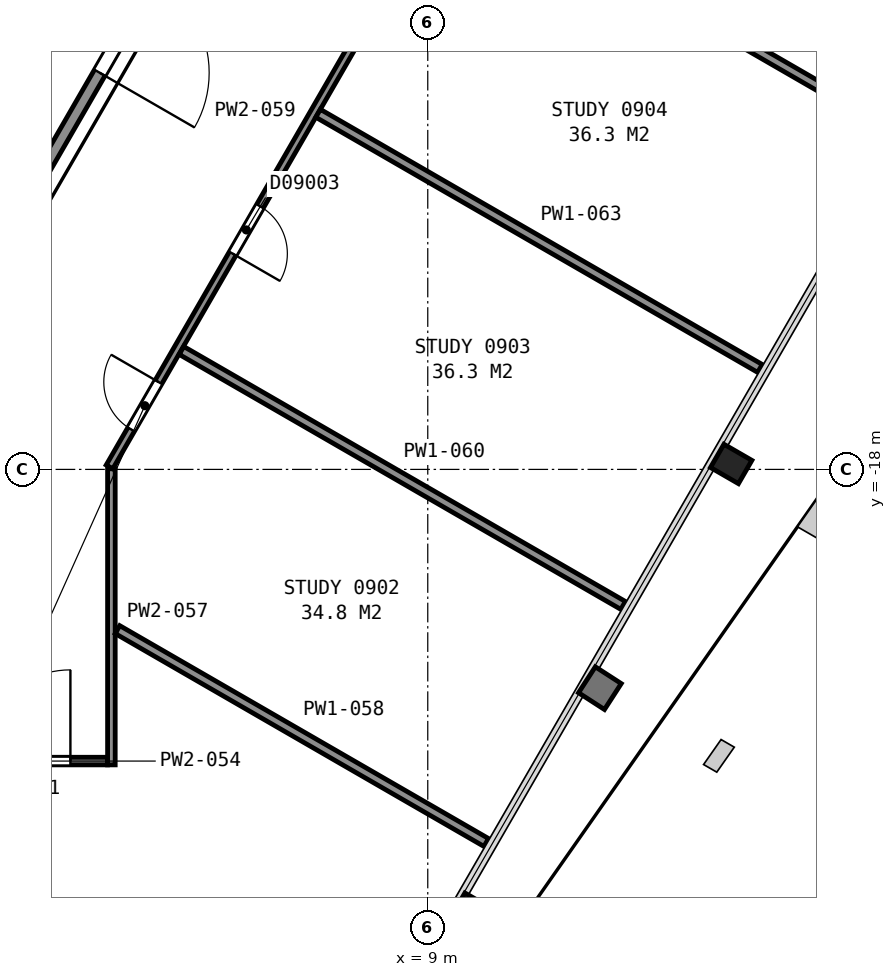
"""IFC4 building model, lengths in metres.
Left out: names, types, materials, properties, quantities, classifications, styles, units other than length and angle.
Written with IfcOpenShell. Run it as: python <this file> out.ifc"""

import sys

from ifc_helpers import new_model, si_unit, direction, frame, frame_2d, origin, origin_2d, place, context, subcontext, project, spatial, rectangle, i_section, extrude, element, fill, save


model = new_model("IFC4")
c1 = context("Model", 3, precision=1e-05, world=origin(), true_north=direction((0.0, 1.0)))
c2 = subcontext(c1, "Body", "Model", "MODEL_VIEW")
j1 = project(units=[si_unit("LENGTHUNIT", "METRE"), si_unit("PLANEANGLEUNIT", "RADIAN")], contexts=[c1])
p1 = place(None, origin())
s1 = spatial("IfcSite", under=j1, at=p1, CompositionType="ELEMENT")
p2 = place(p1, origin())
s2 = spatial("IfcBuilding", under=s1, at=p2, CompositionType="ELEMENT")
p3 = place(p2, frame((0.0, 0.0, 47.6)))
s3 = spatial("IfcBuildingStorey", under=s2, at=p3, CompositionType="ELEMENT", Elevation=47.6)
for number, where, z_axis, x_axis in (
    (1, (9.73, -25.29, 0.025), (0.0, 0.0, 1.0), (-0.5, -0.866, 0.0)),
    (2, (13.99, -17.91, 0.025), (0.0, 0.0, 1.0), (-0.5, -0.866, 0.0)),
):
    element("IfcColumn", number, at=place(p3, frame(where, z_axis=z_axis, x_axis=x_axis)), inside=s3, PredefinedType="COLUMN", context=c2, shape_type="SweptSolid", body=[
        extrude(i_section(OverallWidth=0.442, OverallDepth=0.531, WebThickness=0.066, FlangeThickness=0.106, FilletRadius=0.015, at=origin_2d()), origin(), (0.0, 0.0, 1.0), 3.575),
    ])
p4 = place(p3, frame((1.677, -14.815, 0.0), z_axis=(0.0, 0.0, 1.0), x_axis=(0.49999445743, 0.866028603765, 0.0)))
e3 = element("IfcWall", 3, at=p4, inside=s3, PredefinedType="PARTITIONING", context=c2, shape_type="SweptSolid", body=[
    extrude(rectangle(XDim=5.905, YDim=0.2, at=frame_2d((2.952, 0.0))), origin(), (0.0, 0.0, 1.0), 3.35),
])
p5 = place(p4, frame((3.855, 0.0, 0.0)))
e4 = element("IfcOpeningElement", 4, at=p5, cuts=e3, PredefinedType="OPENING", context=c2, shape_type="SweptSolid", body=[
    extrude(rectangle(XDim=1.8, YDim=2.1, at=frame_2d((0.9, 1.05))), frame((0.0, 0.11, 0.0), z_axis=(0.0, -1.0, 0.0), x_axis=(1.0, 0.0, 0.0)), (0.0, 0.0, 1.0), 0.22),
])
p6 = place(p3, frame((3.732, -22.797, 0.0), z_axis=(0.0, 0.0, 1.0), x_axis=(-1.0, 0.0, 0.0)))
e5 = element("IfcWall", 5, at=p6, inside=s3, PredefinedType="PARTITIONING", context=c2, shape_type="SweptSolid", body=[
    extrude(rectangle(XDim=2.822, YDim=0.125, at=frame_2d((1.411, 0.0))), origin(), (0.0, 0.0, 1.0), 2.613),
])
p7 = place(p6, frame((0.609, 0.0, 0.0)))
e6 = element("IfcOpeningElement", 6, at=p7, cuts=e5, PredefinedType="OPENING", context=c2, shape_type="SweptSolid", body=[
    extrude(rectangle(XDim=1.5, YDim=2.1, at=frame_2d((0.75, 1.05))), frame((0.0, 0.073, 0.0), z_axis=(0.0, -1.0, 0.0), x_axis=(1.0, 0.0, 0.0)), (0.0, 0.0, 1.0), 0.145),
])
p8 = place(p3, frame((3.797, -22.86, 0.0), z_axis=(0.0, 0.0, 1.0), x_axis=(0.0, 1.0, 0.0)))
e7 = element("IfcWall", 7, at=p8, inside=s3, PredefinedType="PARTITIONING", context=c2, shape_type="SweptSolid", body=[
    extrude(rectangle(XDim=4.87, YDim=0.125, at=frame_2d((2.435, 0.0))), origin(), (0.0, 0.0, 1.0), 2.613),
])
p9 = place(p3, frame((3.897, -20.635, 0.0), z_axis=(0.0, 0.0, 1.0), x_axis=(0.866031150847, -0.499990045664, 0.0)))
e8 = element("IfcWall", 8, at=p9, inside=s3, PredefinedType="PARTITIONING", context=c2, shape_type="SweptSolid", body=[
    extrude(rectangle(XDim=7.003, YDim=0.15, at=frame_2d((3.501, 0.0))), origin(), (0.0, 0.0, 1.0), 2.613),
])
p10 = place(p3, frame((17.833, 6.406, 0.0), z_axis=(0.0, 0.0, 1.0), x_axis=(-0.500002884005, -0.866023738697, 0.0)))
e9 = element("IfcWall", 9, at=p10, inside=s3, PredefinedType="PARTITIONING", context=c2, shape_type="SweptSolid", body=[
    extrude(rectangle(XDim=28.135, YDim=0.125, at=frame_2d((14.067, 0.0))), origin(), (0.0, 0.0, 1.0), 2.613),
])
p11 = place(p10, frame((26.522, 0.0, 0.0)))
e10 = element("IfcOpeningElement", 10, at=p11, cuts=e9, PredefinedType="OPENING", context=c2, shape_type="SweptSolid", body=[
    extrude(rectangle(XDim=0.9, YDim=2.1, at=frame_2d((0.45, 1.05))), frame((0.0, 0.073, 0.0), z_axis=(0.0, -1.0, 0.0), x_axis=(1.0, 0.0, 0.0)), (0.0, 0.0, 1.0), 0.145),
])
p12 = place(p10, frame((23.184, 0.0, 0.0)))
e11 = element("IfcOpeningElement", 11, at=p12, cuts=e9, PredefinedType="OPENING", context=c2, shape_type="SweptSolid", body=[
    extrude(rectangle(XDim=0.9, YDim=2.1, at=frame_2d((0.45, 1.05))), frame((0.0, 0.073, 0.0), z_axis=(0.0, -1.0, 0.0), x_axis=(1.0, 0.0, 0.0)), (0.0, 0.0, 1.0), 0.145),
])
p13 = place(p10, frame((18.683, 0.0, 0.0)))
e12 = element("IfcOpeningElement", 12, at=p13, cuts=e9, PredefinedType="OPENING", context=c2, shape_type="SweptSolid", body=[
    extrude(rectangle(XDim=0.9, YDim=2.1, at=frame_2d((0.45, 1.05))), frame((0.0, 0.073, 0.0), z_axis=(0.0, -1.0, 0.0), x_axis=(1.0, 0.0, 0.0)), (0.0, 0.0, 1.0), 0.145),
])
p14 = place(p10, frame((14.182, 0.0, 0.0)))
e13 = element("IfcOpeningElement", 13, at=p14, cuts=e9, PredefinedType="OPENING", context=c2, shape_type="SweptSolid", body=[
    extrude(rectangle(XDim=0.9, YDim=2.1, at=frame_2d((0.45, 1.05))), frame((0.0, 0.073, 0.0), z_axis=(0.0, -1.0, 0.0), x_axis=(1.0, 0.0, 0.0)), (0.0, 0.0, 1.0), 0.145),
])
p15 = place(p10, frame((9.681, 0.0, 0.0)))
e14 = element("IfcOpeningElement", 14, at=p15, cuts=e9, PredefinedType="OPENING", context=c2, shape_type="SweptSolid", body=[
    extrude(rectangle(XDim=0.9, YDim=2.1, at=frame_2d((0.45, 1.05))), frame((0.0, 0.073, 0.0), z_axis=(0.0, -1.0, 0.0), x_axis=(1.0, 0.0, 0.0)), (0.0, 0.0, 1.0), 0.145),
])
p16 = place(p10, frame((5.18, 0.0, 0.0)))
e15 = element("IfcOpeningElement", 15, at=p16, cuts=e9, PredefinedType="OPENING", context=c2, shape_type="SweptSolid", body=[
    extrude(rectangle(XDim=0.9, YDim=2.1, at=frame_2d((0.45, 1.05))), frame((0.0, 0.073, 0.0), z_axis=(0.0, -1.0, 0.0), x_axis=(1.0, 0.0, 0.0)), (0.0, 0.0, 1.0), 0.145),
])
p17 = place(p10, frame((1.278, 0.0, 0.0)))
e16 = element("IfcOpeningElement", 16, at=p17, cuts=e9, PredefinedType="OPENING", context=c2, shape_type="SweptSolid", body=[
    extrude(rectangle(XDim=0.9, YDim=2.1, at=frame_2d((0.45, 1.05))), frame((0.0, 0.073, 0.0), z_axis=(0.0, -1.0, 0.0), x_axis=(1.0, 0.0, 0.0)), (0.0, 0.0, 1.0), 0.145),
])
p18 = place(p3, frame((4.949, -16.044, 0.0), z_axis=(0.0, 0.0, 1.0), x_axis=(0.866040157966, -0.499974444137, 0.0)))
e17 = element("IfcWall", 17, at=p18, inside=s3, PredefinedType="PARTITIONING", context=c2, shape_type="SweptSolid", body=[
    extrude(rectangle(XDim=8.387, YDim=0.15, at=frame_2d((4.193, 0.0))), origin(), (0.0, 0.0, 1.0), 2.613),
])
p19 = place(p3, frame((7.196, -12.143, 0.0), z_axis=(0.0, 0.0, 1.0), x_axis=(0.866010672798, -0.500025513949, 0.0)))
e18 = element("IfcWall", 18, at=p19, inside=s3, PredefinedType="PARTITIONING", context=c2, shape_type="SweptSolid", body=[
    extrude(rectangle(XDim=8.391, YDim=0.15, at=frame_2d((4.196, 0.0))), origin(), (0.0, 0.0, 1.0), 2.613),
])
p20 = place(p3, frame((9.45, -8.248, 0.0), z_axis=(0.0, 0.0, 1.0), x_axis=(0.866040157966, -0.499974444137, 0.0)))
e19 = element("IfcWall", 19, at=p20, inside=s3, PredefinedType="PARTITIONING", context=c2, shape_type="SweptSolid", body=[
    extrude(rectangle(XDim=8.387, YDim=0.15, at=frame_2d((4.193, 0.0))), origin(), (0.0, 0.0, 1.0), 2.613),
])
p21 = place(p5, origin())
e20 = element("IfcDoor", 20, at=p21, inside=s3, OperationType="DOUBLE_DOOR_SINGLE_SWING", PredefinedType="DOOR", context=c2, shape_type="SweptSolid", body=[
    extrude(rectangle(XDim=1.8, YDim=2.1, at=frame_2d((0.9, 1.05))), frame((0.0, 0.025, 0.0), z_axis=(0.0, -1.0, 0.0), x_axis=(1.0, 0.0, 0.0)), (0.0, 0.0, 1.0), 0.05),
])
fill(e4, e20)
p22 = place(p7, origin())
e21 = element("IfcDoor", 21, at=p22, inside=s3, OperationType="DOUBLE_DOOR_SINGLE_SWING", PredefinedType="DOOR", context=c2, shape_type="SweptSolid", body=[
    extrude(rectangle(XDim=1.5, YDim=2.1, at=frame_2d((0.75, 1.05))), frame((0.0, 0.025, 0.0), z_axis=(0.0, -1.0, 0.0), x_axis=(1.0, 0.0, 0.0)), (0.0, 0.0, 1.0), 0.05),
])
fill(e6, e21)
p23 = place(p11, origin())
e22 = element("IfcDoor", 22, at=p23, inside=s3, OperationType="SINGLE_SWING_LEFT", PredefinedType="DOOR", context=c2, shape_type="SweptSolid", body=[
    extrude(rectangle(XDim=0.9, YDim=2.1, at=frame_2d((0.45, 1.05))), frame((0.0, 0.025, 0.0), z_axis=(0.0, -1.0, 0.0), x_axis=(1.0, 0.0, 0.0)), (0.0, 0.0, 1.0), 0.05),
])
fill(e10, e22)
p24 = place(p12, origin())
e23 = element("IfcDoor", 23, at=p24, inside=s3, OperationType="SINGLE_SWING_RIGHT", PredefinedType="DOOR", context=c2, shape_type="SweptSolid", body=[
    extrude(rectangle(XDim=0.9, YDim=2.1, at=frame_2d((0.45, 1.05))), frame((0.0, 0.025, 0.0), z_axis=(0.0, -1.0, 0.0), x_axis=(1.0, 0.0, 0.0)), (0.0, 0.0, 1.0), 0.05),
])
fill(e11, e23)
save(model, sys.argv[1])
